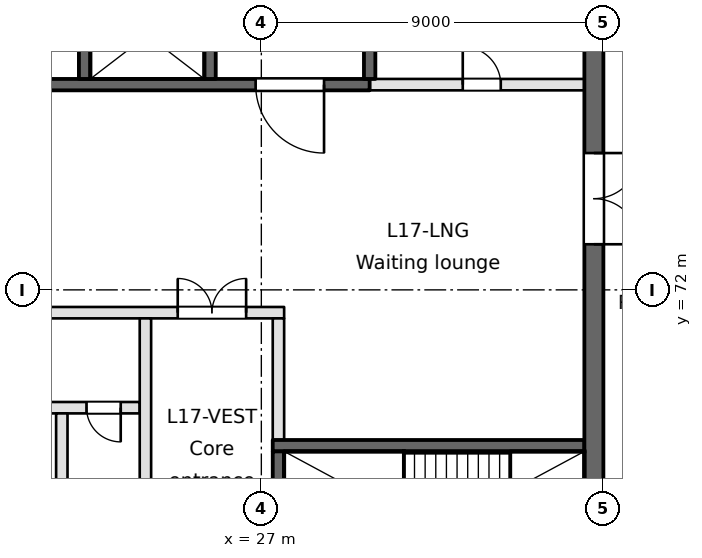
"""IFC4 building model, lengths in metres.
Left out: names, types, materials, properties, quantities, classifications, styles, units other than length and angle.
Written with IfcOpenShell. Run it as: python <this file> out.ifc"""

import sys

from ifc_helpers import new_model, si_unit, direction, frame, frame_2d, origin, place, context, subcontext, project, spatial, rectangle, extrude, element, fill, save


model = new_model("IFC4")
c1 = context("Model", 3, precision=1e-05, world=origin(), true_north=direction((0.0, 1.0)))
c2 = subcontext(c1, "Body", "Model", "MODEL_VIEW")
j1 = project(units=[si_unit("LENGTHUNIT", "METRE"), si_unit("PLANEANGLEUNIT", "RADIAN")], contexts=[c1])
p1 = place(None, origin())
s1 = spatial("IfcSite", under=j1, at=p1, CompositionType="ELEMENT")
p2 = place(p1, origin())
s2 = spatial("IfcBuilding", under=s1, at=p2, CompositionType="ELEMENT")
p3 = place(p2, frame((0.0, 0.0, 72.8)))
s3 = spatial("IfcBuildingStorey", under=s2, at=p3, CompositionType="ELEMENT", Elevation=72.8)
p4 = place(p3, frame((27.3, 67.9, -0.4), z_axis=(0.0, 0.0, 1.0), x_axis=(1.0, 0.0, 0.0)))
e1 = element("IfcWall", 1, at=p4, inside=s3, PredefinedType="SOLIDWALL", context=c2, shape_type="SweptSolid", body=[
    extrude(rectangle(XDim=8.2, YDim=0.3, at=frame_2d((4.1, 0.0))), origin(), (0.0, 0.0, 1.0), 3.7),
])
p5 = place(p3, frame((10.1, 68.9, 0.0), z_axis=(0.0, 0.0, 1.0), x_axis=(1.0, 0.0, 0.0)))
e2 = element("IfcWall", 2, at=p5, inside=s3, PredefinedType="PARTITIONING", context=c2, shape_type="SweptSolid", body=[
    extrude(rectangle(XDim=13.7, YDim=0.3, at=frame_2d((6.85, 0.0))), origin(), (0.0, 0.0, 1.0), 3.3),
])
p6 = place(p5, frame((1.2, 0.0, 0.0)))
e3 = element("IfcOpeningElement", 3, at=p6, cuts=e2, PredefinedType="OPENING", context=c2, shape_type="SweptSolid", body=[
    extrude(rectangle(XDim=0.9, YDim=2.1, at=frame_2d((0.45, 1.05))), frame((0.0, 0.15, 0.0), z_axis=(0.0, -1.0, 0.0), x_axis=(1.0, 0.0, 0.0)), (0.0, 0.0, 1.0), 0.3),
])
p7 = place(p5, frame((4.9, 0.0, 0.0)))
e4 = element("IfcOpeningElement", 4, at=p7, cuts=e2, PredefinedType="OPENING", context=c2, shape_type="SweptSolid", body=[
    extrude(rectangle(XDim=0.9, YDim=2.1, at=frame_2d((0.45, 1.05))), frame((0.0, 0.15, 0.0), z_axis=(0.0, -1.0, 0.0), x_axis=(1.0, 0.0, 0.0)), (0.0, 0.0, 1.0), 0.3),
])
p8 = place(p5, frame((8.95, 0.0, 0.0)))
e5 = element("IfcOpeningElement", 5, at=p8, cuts=e2, PredefinedType="OPENING", context=c2, shape_type="SweptSolid", body=[
    extrude(rectangle(XDim=1.0, YDim=2.1, at=frame_2d((0.5, 1.05))), frame((0.0, 0.15, 0.0), z_axis=(0.0, -1.0, 0.0), x_axis=(1.0, 0.0, 0.0)), (0.0, 0.0, 1.0), 0.3),
])
p9 = place(p5, frame((12.3, 0.0, 0.0)))
e6 = element("IfcOpeningElement", 6, at=p9, cuts=e2, PredefinedType="OPENING", context=c2, shape_type="SweptSolid", body=[
    extrude(rectangle(XDim=0.9, YDim=2.1, at=frame_2d((0.45, 1.05))), frame((0.0, 0.15, 0.0), z_axis=(0.0, -1.0, 0.0), x_axis=(1.0, 0.0, 0.0)), (0.0, 0.0, 1.0), 0.3),
])
p10 = place(p3, frame((9.95, 71.4, 0.0), z_axis=(0.0, 0.0, 1.0), x_axis=(1.0, 0.0, 0.0)))
e7 = element("IfcWall", 7, at=p10, inside=s3, PredefinedType="PARTITIONING", context=c2, shape_type="SweptSolid", body=[
    extrude(rectangle(XDim=17.65, YDim=0.3, at=frame_2d((8.825, 0.0))), origin(), (0.0, 0.0, 1.0), 3.3),
])
p11 = place(p10, frame((14.85, 0.0, 0.0)))
e8 = element("IfcOpeningElement", 8, at=p11, cuts=e7, PredefinedType="OPENING", context=c2, shape_type="SweptSolid", body=[
    extrude(rectangle(XDim=1.8, YDim=2.1, at=frame_2d((0.9, 1.05))), frame((0.0, 0.15, 0.0), z_axis=(0.0, -1.0, 0.0), x_axis=(1.0, 0.0, 0.0)), (0.0, 0.0, 1.0), 0.3),
])
p12 = place(p10, frame((6.4, 0.0, 0.0)))
e9 = element("IfcOpeningElement", 9, at=p12, cuts=e7, PredefinedType="OPENING", context=c2, shape_type="SweptSolid", body=[
    extrude(rectangle(XDim=1.2, YDim=2.1, at=frame_2d((0.6, 1.05))), frame((0.0, 0.15, 0.0), z_axis=(0.0, -1.0, 0.0), x_axis=(1.0, 0.0, 0.0)), (0.0, 0.0, 1.0), 0.3),
])
p13 = place(p3, frame((0.9, 77.4, -0.4), z_axis=(0.0, 0.0, 1.0), x_axis=(1.0, 0.0, 0.0)))
e10 = element("IfcWall", 10, at=p13, inside=s3, PredefinedType="SOLIDWALL", context=c2, shape_type="SweptSolid", body=[
    extrude(rectangle(XDim=28.95, YDim=0.3, at=frame_2d((14.475, 0.0))), origin(), (0.0, 0.0, 1.0), 3.7),
])
p14 = place(p13, frame((4.35, 0.0, 0.4)))
e11 = element("IfcOpeningElement", 11, at=p14, cuts=e10, PredefinedType="OPENING", context=c2, shape_type="SweptSolid", body=[
    extrude(rectangle(XDim=1.8, YDim=2.1, at=frame_2d((0.9, 1.05))), frame((0.0, 0.15, 0.0), z_axis=(0.0, -1.0, 0.0), x_axis=(1.0, 0.0, 0.0)), (0.0, 0.0, 1.0), 0.3),
])
p15 = place(p13, frame((25.95, 0.0, 0.4)))
e12 = element("IfcOpeningElement", 12, at=p15, cuts=e10, PredefinedType="OPENING", context=c2, shape_type="SweptSolid", body=[
    extrude(rectangle(XDim=1.8, YDim=2.1, at=frame_2d((0.9, 1.05))), frame((0.0, 0.15, 0.0), z_axis=(0.0, -1.0, 0.0), x_axis=(1.0, 0.0, 0.0)), (0.0, 0.0, 1.0), 0.3),
])
p16 = place(p13, frame((11.95, 0.0, 0.4)))
e13 = element("IfcOpeningElement", 13, at=p16, cuts=e10, PredefinedType="OPENING", context=c2, shape_type="SweptSolid", body=[
    extrude(rectangle(XDim=1.0, YDim=2.1, at=frame_2d((0.5, 1.05))), frame((0.0, 0.15, 0.0), z_axis=(0.0, -1.0, 0.0), x_axis=(1.0, 0.0, 0.0)), (0.0, 0.0, 1.0), 0.3),
])
p17 = place(p13, frame((19.15, 0.0, 0.4)))
e14 = element("IfcOpeningElement", 14, at=p17, cuts=e10, PredefinedType="OPENING", context=c2, shape_type="SweptSolid", body=[
    extrude(rectangle(XDim=1.0, YDim=2.1, at=frame_2d((0.5, 1.05))), frame((0.0, 0.15, 0.0), z_axis=(0.0, -1.0, 0.0), x_axis=(1.0, 0.0, 0.0)), (0.0, 0.0, 1.0), 0.3),
])
p18 = place(p3, frame((29.85, 77.4, 0.0), z_axis=(0.0, 0.0, 1.0), x_axis=(1.0, 0.0, 0.0)))
e15 = element("IfcWall", 15, at=p18, inside=s3, PredefinedType="PARTITIONING", context=c2, shape_type="SweptSolid", body=[
    extrude(rectangle(XDim=5.65, YDim=0.3, at=frame_2d((2.825, 0.0))), origin(), (0.0, 0.0, 1.0), 3.3),
])
p19 = place(p18, frame((2.45, 0.0, 0.0)))
e16 = element("IfcOpeningElement", 16, at=p19, cuts=e15, PredefinedType="OPENING", context=c2, shape_type="SweptSolid", body=[
    extrude(rectangle(XDim=1.0, YDim=2.1, at=frame_2d((0.5, 1.05))), frame((0.0, 0.15, 0.0), z_axis=(0.0, -1.0, 0.0), x_axis=(1.0, 0.0, 0.0)), (0.0, 0.0, 1.0), 0.3),
])
p20 = place(p3, frame((21.75, 63.5, 0.0), z_axis=(0.0, 0.0, 1.0), x_axis=(0.0, 1.0, 0.0)))
e17 = element("IfcWall", 17, at=p20, inside=s3, PredefinedType="PARTITIONING", context=c2, shape_type="SweptSolid", body=[
    extrude(rectangle(XDim=5.25, YDim=0.3, at=frame_2d((2.625, 0.0))), origin(), (0.0, 0.0, 1.0), 3.3),
])
p21 = place(p3, frame((22.35, 77.55, -0.4), z_axis=(0.0, 0.0, 1.0), x_axis=(0.0, 1.0, 0.0)))
e18 = element("IfcWall", 18, at=p21, inside=s3, PredefinedType="SOLIDWALL", context=c2, shape_type="SweptSolid", body=[
    extrude(rectangle(XDim=10.1, YDim=0.3, at=frame_2d((5.05, 0.0))), origin(), (0.0, 0.0, 1.0), 3.7),
])
p22 = place(p3, frame((23.95, 63.5, 0.0), z_axis=(0.0, 0.0, 1.0), x_axis=(0.0, 1.0, 0.0)))
e19 = element("IfcWall", 19, at=p22, inside=s3, PredefinedType="PARTITIONING", context=c2, shape_type="SweptSolid", body=[
    extrude(rectangle(XDim=7.75, YDim=0.3, at=frame_2d((3.875, 0.0))), origin(), (0.0, 0.0, 1.0), 3.3),
])
p23 = place(p3, frame((25.65, 77.55, -0.4), z_axis=(0.0, 0.0, 1.0), x_axis=(0.0, 1.0, 0.0)))
e20 = element("IfcWall", 20, at=p23, inside=s3, PredefinedType="SOLIDWALL", context=c2, shape_type="SweptSolid", body=[
    extrude(rectangle(XDim=10.1, YDim=0.3, at=frame_2d((5.05, 0.0))), origin(), (0.0, 0.0, 1.0), 3.7),
])
p24 = place(p3, frame((27.45, 63.5, -0.4), z_axis=(0.0, 0.0, 1.0), x_axis=(0.0, 1.0, 0.0)))
e21 = element("IfcWall", 21, at=p24, inside=s3, PredefinedType="SOLIDWALL", context=c2, shape_type="SweptSolid", body=[
    extrude(rectangle(XDim=4.25, YDim=0.3, at=frame_2d((2.125, 0.0))), origin(), (0.0, 0.0, 1.0), 3.7),
])
p25 = place(p3, frame((27.45, 68.05, 0.0), z_axis=(0.0, 0.0, 1.0), x_axis=(0.0, 1.0, 0.0)))
e22 = element("IfcWall", 22, at=p25, inside=s3, PredefinedType="PARTITIONING", context=c2, shape_type="SweptSolid", body=[
    extrude(rectangle(XDim=3.2, YDim=0.3, at=frame_2d((1.6, 0.0))), origin(), (0.0, 0.0, 1.0), 3.3),
])
p26 = place(p3, frame((29.85, 77.55, -0.4), z_axis=(0.0, 0.0, 1.0), x_axis=(0.0, 1.0, 0.0)))
e23 = element("IfcWall", 23, at=p26, inside=s3, PredefinedType="SOLIDWALL", context=c2, shape_type="SweptSolid", body=[
    extrude(rectangle(XDim=10.1, YDim=0.3, at=frame_2d((5.05, 0.0))), origin(), (0.0, 0.0, 1.0), 3.7),
])
p27 = place(p3, frame((35.75, 63.5, -0.4), z_axis=(0.0, 0.0, 1.0), x_axis=(0.0, 1.0, 0.0)))
e24 = element("IfcWall", 24, at=p27, inside=s3, PredefinedType="SOLIDWALL", context=c2, shape_type="SweptSolid", body=[
    extrude(rectangle(XDim=34.6, YDim=0.5, at=frame_2d((17.3, 0.0))), origin(), (0.0, 0.0, 1.0), 3.7),
])
p28 = place(p27, frame((9.7, 0.0, 0.4)))
e25 = element("IfcOpeningElement", 25, at=p28, cuts=e24, PredefinedType="OPENING", context=c2, shape_type="SweptSolid", body=[
    extrude(rectangle(XDim=2.4, YDim=2.1, at=frame_2d((1.2, 1.05))), frame((0.0, 0.25, 0.0), z_axis=(0.0, -1.0, 0.0), x_axis=(1.0, 0.0, 0.0)), (0.0, 0.0, 1.0), 0.5),
])
p29 = place(p27, frame((27.9, 0.0, 0.4)))
e26 = element("IfcOpeningElement", 26, at=p29, cuts=e24, PredefinedType="OPENING", context=c2, shape_type="SweptSolid", body=[
    extrude(rectangle(XDim=1.5, YDim=2.1, at=frame_2d((0.75, 1.05))), frame((0.0, 0.25, 0.0), z_axis=(0.0, -1.0, 0.0), x_axis=(1.0, 0.0, 0.0)), (0.0, 0.0, 1.0), 0.5),
])
p30 = place(p27, frame((1.5, 0.0, 0.4)))
e27 = element("IfcOpeningElement", 27, at=p30, cuts=e24, PredefinedType="OPENING", context=c2, shape_type="SweptSolid", body=[
    extrude(rectangle(XDim=1.2, YDim=2.1, at=frame_2d((0.6, 1.05))), frame((0.0, 0.25, 0.0), z_axis=(0.0, -1.0, 0.0), x_axis=(1.0, 0.0, 0.0)), (0.0, 0.0, 1.0), 0.5),
])
p31 = place(p15, frame((1.8, 0.0, 0.0), z_axis=(0.0, 0.0, 1.0), x_axis=(-1.0, 0.0, 0.0)))
e28 = element("IfcDoor", 28, at=p31, inside=s3, OperationType="SINGLE_SWING_LEFT", PredefinedType="DOOR", context=c2, shape_type="SweptSolid", body=[
    extrude(rectangle(XDim=1.8, YDim=2.1, at=frame_2d((0.9, 1.05))), frame((0.0, 0.025, 0.0), z_axis=(0.0, -1.0, 0.0), x_axis=(1.0, 0.0, 0.0)), (0.0, 0.0, 1.0), 0.05),
])
fill(e12, e28)
p32 = place(p28, frame((2.4, 0.0, 0.0), z_axis=(0.0, 0.0, 1.0), x_axis=(-1.0, 0.0, 0.0)))
e29 = element("IfcDoor", 29, at=p32, inside=s3, OperationType="DOUBLE_DOOR_SINGLE_SWING", PredefinedType="DOOR", context=c2, shape_type="SweptSolid", body=[
    extrude(rectangle(XDim=2.4, YDim=2.1, at=frame_2d((1.2, 1.05))), frame((0.0, 0.025, 0.0), z_axis=(0.0, -1.0, 0.0), x_axis=(1.0, 0.0, 0.0)), (0.0, 0.0, 1.0), 0.05),
])
fill(e25, e29)
p33 = place(p11, origin())
e30 = element("IfcDoor", 30, at=p33, inside=s3, OperationType="DOUBLE_DOOR_SINGLE_SWING", PredefinedType="DOOR", context=c2, shape_type="SweptSolid", body=[
    extrude(rectangle(XDim=1.8, YDim=2.1, at=frame_2d((0.9, 1.05))), frame((0.0, 0.025, 0.0), z_axis=(0.0, -1.0, 0.0), x_axis=(1.0, 0.0, 0.0)), (0.0, 0.0, 1.0), 0.05),
])
fill(e8, e30)
p34 = place(p9, frame((0.9, 0.0, 0.0), z_axis=(0.0, 0.0, 1.0), x_axis=(-1.0, 0.0, 0.0)))
e31 = element("IfcDoor", 31, at=p34, inside=s3, OperationType="SINGLE_SWING_LEFT", PredefinedType="DOOR", context=c2, shape_type="SweptSolid", body=[
    extrude(rectangle(XDim=0.9, YDim=2.1, at=frame_2d((0.45, 1.05))), frame((0.0, 0.025, 0.0), z_axis=(0.0, -1.0, 0.0), x_axis=(1.0, 0.0, 0.0)), (0.0, 0.0, 1.0), 0.05),
])
fill(e6, e31)
p35 = place(p19, origin())
e32 = element("IfcDoor", 32, at=p35, inside=s3, OperationType="SINGLE_SWING_LEFT", PredefinedType="DOOR", context=c2, shape_type="SweptSolid", body=[
    extrude(rectangle(XDim=1.0, YDim=2.1, at=frame_2d((0.5, 1.05))), frame((0.0, 0.025, 0.0), z_axis=(0.0, -1.0, 0.0), x_axis=(1.0, 0.0, 0.0)), (0.0, 0.0, 1.0), 0.05),
])
fill(e16, e32)
save(model, sys.argv[1])
